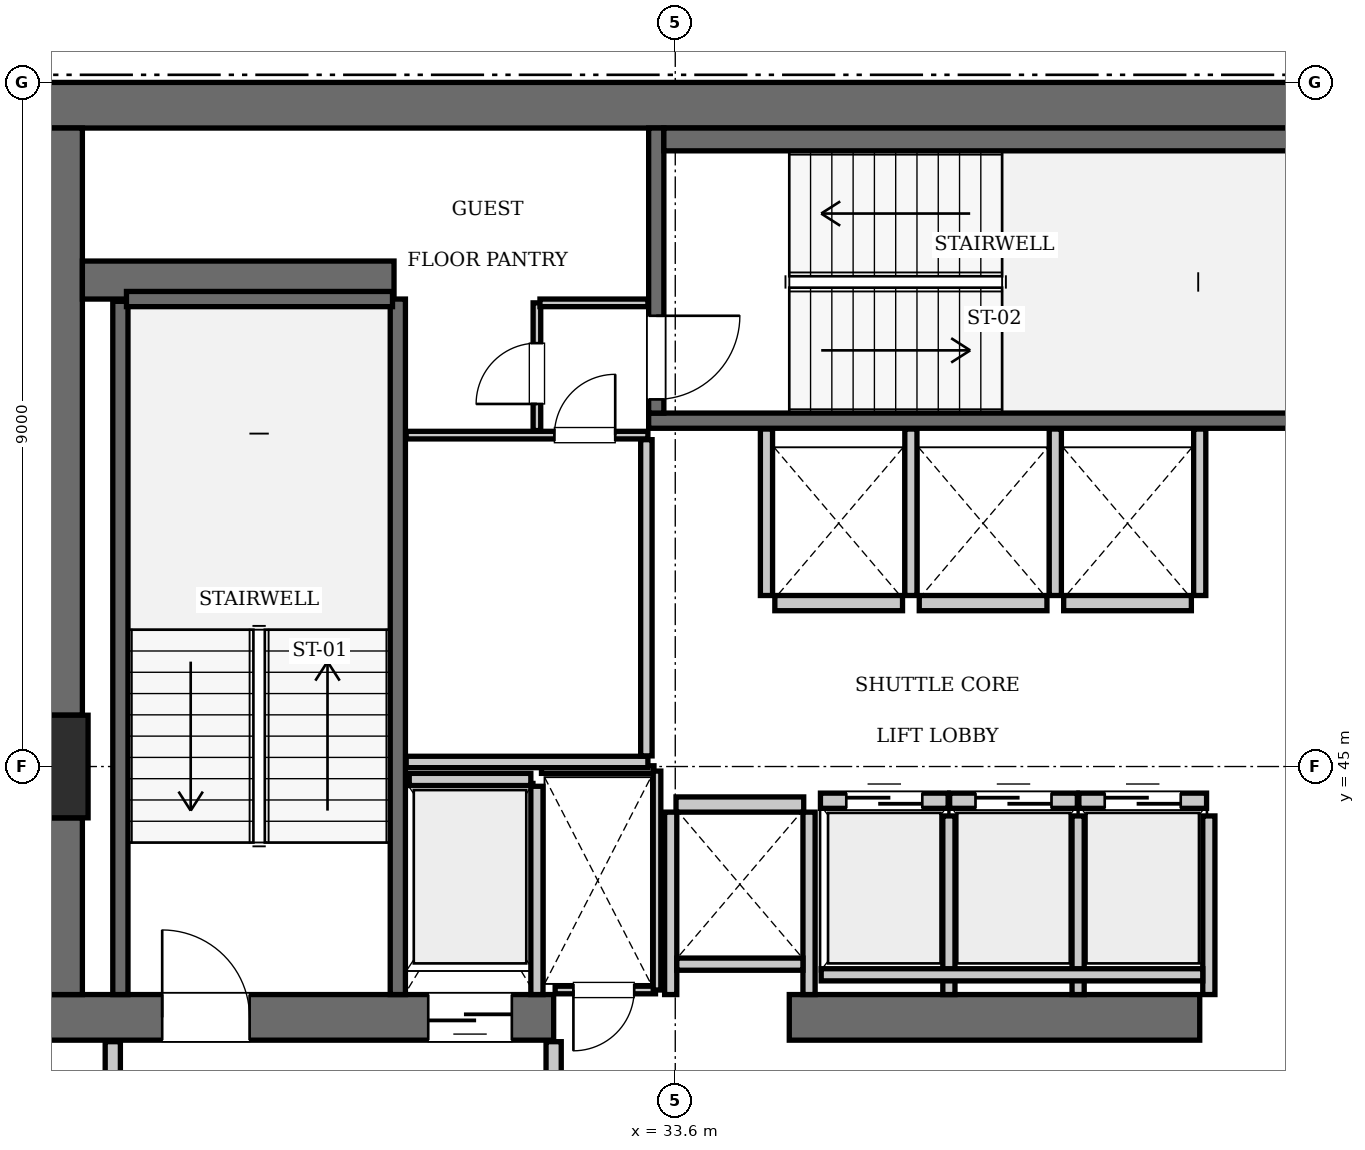
"""IFC4 building model, lengths in metres.
Left out: names, types, materials, properties, quantities, classifications, styles, units other than length and angle.
Written with IfcOpenShell. Run it as: python <this file> out.ifc"""

import sys

from ifc_helpers import new_model, si_unit, direction, frame, frame_2d, origin, origin_2d, place, context, subcontext, project, spatial, rectangle, extrude, element, fill, save


model = new_model("IFC4")
c1 = context("Model", 3, precision=1e-05, world=origin(), true_north=direction((0.0, 1.0)))
c2 = subcontext(c1, "Body", "Model", "MODEL_VIEW")
j1 = project(units=[si_unit("LENGTHUNIT", "METRE"), si_unit("PLANEANGLEUNIT", "RADIAN")], contexts=[c1])
p1 = place(None, origin())
s1 = spatial("IfcSite", under=j1, at=p1, CompositionType="ELEMENT")
p2 = place(p1, origin())
s2 = spatial("IfcBuilding", under=s1, at=p2, CompositionType="ELEMENT")
p3 = place(p2, frame((0.0, 0.0, 333.55)))
s3 = spatial("IfcBuildingStorey", under=s2, at=p3, CompositionType="ELEMENT", Elevation=333.55)
p4 = place(p3, frame((25.2, 45.0, 0.0), z_axis=(0.0, 0.0, 1.0), x_axis=(1.0, 0.0, 0.0)))
e1 = element("IfcColumn", 1, at=p4, inside=s3, PredefinedType="COLUMN", context=c2, shape_type="SweptSolid", body=[
    extrude(rectangle(XDim=1.35, YDim=1.35, at=origin_2d()), origin(), (0.0, 0.0, 1.0), 3.85),
])
p5 = place(p3, frame((25.2, 53.7, 0.0), z_axis=(0.0, 0.0, 1.0), x_axis=(1.0, 0.0, 0.0)))
e2 = element("IfcWall", 2, at=p5, inside=s3, PredefinedType="SHEAR", context=c2, shape_type="SweptSolid", body=[
    extrude(rectangle(XDim=25.2, YDim=0.6, at=frame_2d((12.6, 0.0))), origin(), (0.0, 0.0, 1.0), 3.85),
])
p6 = place(p3, frame((25.2, 41.7, 0.0), z_axis=(0.0, 0.0, 1.0), x_axis=(1.0, 0.0, 0.0)))
e3 = element("IfcWall", 3, at=p6, inside=s3, PredefinedType="SHEAR", context=c2, shape_type="SweptSolid", body=[
    extrude(rectangle(XDim=6.8, YDim=0.6, at=frame_2d((3.4, 0.0))), origin(), (0.0, 0.0, 1.0), 3.85),
])
p7 = place(p6, frame((1.65, 0.0, 0.0)))
e4 = element("IfcOpeningElement", 4, at=p7, cuts=e3, PredefinedType="OPENING", context=c2, shape_type="SweptSolid", body=[
    extrude(rectangle(XDim=1.15, YDim=2.15, at=frame_2d((0.575, 1.075))), frame((0.0, 0.31, 0.0), z_axis=(0.0, -1.0, 0.0), x_axis=(1.0, 0.0, 0.0)), (0.0, 0.0, 1.0), 0.62),
])
p8 = place(p6, frame((5.15, 0.0, 0.0)))
e5 = element("IfcOpeningElement", 5, at=p8, cuts=e3, PredefinedType="OPENING", context=c2, shape_type="SweptSolid", body=[
    extrude(rectangle(XDim=1.1, YDim=2.2, at=frame_2d((0.55, 1.1))), frame((0.0, 0.31, 0.0), z_axis=(0.0, -1.0, 0.0), x_axis=(1.0, 0.0, 0.0)), (0.0, 0.0, 1.0), 0.62),
])
p9 = place(p3, frame((35.1, 41.7, 0.0), z_axis=(0.0, 0.0, 1.0), x_axis=(1.0, 0.0, 0.0)))
e6 = element("IfcWall", 6, at=p9, inside=s3, PredefinedType="SHEAR", context=c2, shape_type="SweptSolid", body=[
    extrude(rectangle(XDim=5.4, YDim=0.6, at=frame_2d((2.7, 0.0))), origin(), (0.0, 0.0, 1.0), 3.85),
])
p10 = place(p3, frame((25.5, 42.0, 0.0), z_axis=(0.0, 0.0, 1.0), x_axis=(0.0, 1.0, 0.0)))
e7 = element("IfcWall", 7, at=p10, inside=s3, PredefinedType="SHEAR", context=c2, shape_type="SweptSolid", body=[
    extrude(rectangle(XDim=2.325, YDim=0.6, at=frame_2d((1.163, 0.0))), origin(), (0.0, 0.0, 1.0), 3.85),
])
p11 = place(p3, frame((25.5, 45.675, 0.0), z_axis=(0.0, 0.0, 1.0), x_axis=(0.0, 1.0, 0.0)))
e8 = element("IfcWall", 8, at=p11, inside=s3, PredefinedType="SHEAR", context=c2, shape_type="SweptSolid", body=[
    extrude(rectangle(XDim=7.725, YDim=0.6, at=frame_2d((3.862, 0.0))), origin(), (0.0, 0.0, 1.0), 3.85),
])
p12 = place(p3, frame((25.8, 51.4, 0.0), z_axis=(0.0, 0.0, 1.0), x_axis=(1.0, 0.0, 0.0)))
e9 = element("IfcWall", 9, at=p12, inside=s3, PredefinedType="SHEAR", context=c2, shape_type="SweptSolid", body=[
    extrude(rectangle(XDim=4.1, YDim=0.5, at=frame_2d((2.05, 0.0))), origin(), (0.0, 0.0, 1.0), 3.85),
])
p13 = place(p3, frame((29.95, 42.0, 0.0), z_axis=(0.0, 0.0, 1.0), x_axis=(0.0, 1.0, 0.0)))
e10 = element("IfcWall", 10, at=p13, inside=s3, PredefinedType="SOLIDWALL", context=c2, shape_type="SweptSolid", body=[
    extrude(rectangle(XDim=9.15, YDim=0.2, at=frame_2d((4.575, 0.0))), origin(), (0.0, 0.0, 1.0), 3.61),
])
p14 = place(p3, frame((26.3, 42.0, 0.0), z_axis=(0.0, 0.0, 1.0), x_axis=(0.0, 1.0, 0.0)))
e11 = element("IfcWall", 11, at=p14, inside=s3, PredefinedType="SOLIDWALL", context=c2, shape_type="SweptSolid", body=[
    extrude(rectangle(XDim=9.12, YDim=0.2, at=frame_2d((4.56, 0.0))), origin(), (0.0, 0.0, 1.0), 3.61),
])
p15 = place(p3, frame((26.38, 51.15, 0.0), z_axis=(0.0, 0.0, 1.0), x_axis=(1.0, 0.0, 0.0)))
e12 = element("IfcWall", 12, at=p15, inside=s3, PredefinedType="SOLIDWALL", context=c2, shape_type="SweptSolid", body=[
    extrude(rectangle(XDim=3.5, YDim=0.2, at=frame_2d((1.75, 0.0))), origin(), (0.0, 0.0, 1.0), 3.61),
])
p16 = place(p3, frame((33.25, 49.55, 0.0), z_axis=(0.0, 0.0, 1.0), x_axis=(1.0, 0.0, 0.0)))
e13 = element("IfcWall", 13, at=p16, inside=s3, PredefinedType="SOLIDWALL", context=c2, shape_type="SweptSolid", body=[
    extrude(rectangle(XDim=9.1, YDim=0.2, at=frame_2d((4.55, 0.0))), origin(), (0.0, 0.0, 1.0), 3.61),
])
p17 = place(p3, frame((33.35, 49.65, 0.0), z_axis=(0.0, 0.0, 1.0), x_axis=(0.0, 1.0, 0.0)))
e14 = element("IfcWall", 14, at=p17, inside=s3, PredefinedType="SOLIDWALL", context=c2, shape_type="SweptSolid", body=[
    extrude(rectangle(XDim=3.75, YDim=0.2, at=frame_2d((1.875, 0.0))), origin(), (0.0, 0.0, 1.0), 3.61),
])
p18 = place(p17, frame((0.18, 0.0, 0.0)))
e15 = element("IfcOpeningElement", 15, at=p18, cuts=e14, PredefinedType="OPENING", context=c2, shape_type="SweptSolid", body=[
    extrude(rectangle(XDim=1.1, YDim=2.15, at=frame_2d((0.55, 1.075))), frame((0.0, 0.11, 0.0), z_axis=(0.0, -1.0, 0.0), x_axis=(1.0, 0.0, 0.0)), (0.0, 0.0, 1.0), 0.22),
])
p19 = place(p3, frame((33.45, 53.25, 0.0), z_axis=(0.0, 0.0, 1.0), x_axis=(1.0, 0.0, 0.0)))
e16 = element("IfcWall", 16, at=p19, inside=s3, PredefinedType="SOLIDWALL", context=c2, shape_type="SweptSolid", body=[
    extrude(rectangle(XDim=8.7, YDim=0.3, at=frame_2d((4.35, 0.0))), origin(), (0.0, 0.0, 1.0), 3.61),
])
p20 = place(p3, frame((35.51, 44.55, 0.0), z_axis=(0.0, 0.0, 1.0), x_axis=(1.0, 0.0, 0.0)))
e17 = element("IfcWall", 17, at=p20, inside=s3, PredefinedType="SOLIDWALL", context=c2, shape_type="SweptSolid", body=[
    extrude(rectangle(XDim=1.68, YDim=0.2, at=frame_2d((0.84, 0.0))), origin(), (0.0, 0.0, 1.0), 3.61),
])
p21 = place(p20, frame((0.34, 0.0, 0.0)))
e18 = element("IfcOpeningElement", 18, at=p21, cuts=e17, PredefinedType="OPENING", context=c2, shape_type="SweptSolid", body=[
    extrude(rectangle(XDim=1.0, YDim=2.15, at=frame_2d((0.5, 1.075))), frame((0.0, 0.11, 0.0), z_axis=(0.0, -1.0, 0.0), x_axis=(1.0, 0.0, 0.0)), (0.0, 0.0, 1.0), 0.22),
])
p22 = place(p3, frame((37.21, 44.55, 0.0), z_axis=(0.0, 0.0, 1.0), x_axis=(1.0, 0.0, 0.0)))
e19 = element("IfcWall", 19, at=p22, inside=s3, PredefinedType="SOLIDWALL", context=c2, shape_type="SweptSolid", body=[
    extrude(rectangle(XDim=1.68, YDim=0.2, at=frame_2d((0.84, 0.0))), origin(), (0.0, 0.0, 1.0), 3.61),
])
p23 = place(p22, frame((0.34, 0.0, 0.0)))
e20 = element("IfcOpeningElement", 20, at=p23, cuts=e19, PredefinedType="OPENING", context=c2, shape_type="SweptSolid", body=[
    extrude(rectangle(XDim=1.0, YDim=2.15, at=frame_2d((0.5, 1.075))), frame((0.0, 0.11, 0.0), z_axis=(0.0, -1.0, 0.0), x_axis=(1.0, 0.0, 0.0)), (0.0, 0.0, 1.0), 0.22),
])
p24 = place(p3, frame((38.91, 44.55, 0.0), z_axis=(0.0, 0.0, 1.0), x_axis=(1.0, 0.0, 0.0)))
e21 = element("IfcWall", 21, at=p24, inside=s3, PredefinedType="SOLIDWALL", context=c2, shape_type="SweptSolid", body=[
    extrude(rectangle(XDim=1.68, YDim=0.2, at=frame_2d((0.84, 0.0))), origin(), (0.0, 0.0, 1.0), 3.61),
])
p25 = place(p24, frame((0.34, 0.0, 0.0)))
e22 = element("IfcOpeningElement", 22, at=p25, cuts=e21, PredefinedType="OPENING", context=c2, shape_type="SweptSolid", body=[
    extrude(rectangle(XDim=1.0, YDim=2.15, at=frame_2d((0.5, 1.075))), frame((0.0, 0.11, 0.0), z_axis=(0.0, -1.0, 0.0), x_axis=(1.0, 0.0, 0.0)), (0.0, 0.0, 1.0), 0.22),
])
p26 = place(p3, frame((34.91, 47.15, 0.0), z_axis=(0.0, 0.0, 1.0), x_axis=(1.0, 0.0, 0.0)))
e23 = element("IfcWall", 23, at=p26, inside=s3, PredefinedType="SOLIDWALL", context=c2, shape_type="SweptSolid", body=[
    extrude(rectangle(XDim=1.68, YDim=0.2, at=frame_2d((0.84, 0.0))), origin(), (0.0, 0.0, 1.0), 3.61),
])
for number, where, z_axis, x_axis in (
    (24, (36.81, 47.15, 0.0), (0.0, 0.0, 1.0), (1.0, 0.0, 0.0)),
    (25, (38.71, 47.15, 0.0), (0.0, 0.0, 1.0), (1.0, 0.0, 0.0)),
    (26, (33.61, 44.5, 0.0), (0.0, 0.0, 1.0), (1.0, 0.0, 0.0)),
):
    element("IfcWall", number, at=place(p3, frame(where, z_axis=z_axis, x_axis=x_axis)), inside=s3, PredefinedType="SOLIDWALL", context=c2, shape_type="SweptSolid", body=[
        extrude(rectangle(XDim=1.68, YDim=0.2, at=frame_2d((0.84, 0.0))), origin(), (0.0, 0.0, 1.0), 3.61),
    ])
p27 = place(p3, frame((30.1, 44.83, 0.0), z_axis=(0.0, 0.0, 1.0), x_axis=(1.0, 0.0, 0.0)))
e27 = element("IfcWall", 27, at=p27, inside=s3, PredefinedType="SOLIDWALL", context=c2, shape_type="SweptSolid", body=[
    extrude(rectangle(XDim=1.6, YDim=0.16, at=frame_2d((0.8, 0.0))), origin(), (0.0, 0.0, 1.0), 3.61),
])
p28 = place(p3, frame((31.78, 42.0, 0.0), z_axis=(0.0, 0.0, 1.0), x_axis=(0.0, 1.0, 0.0)))
e28 = element("IfcWall", 28, at=p28, inside=s3, PredefinedType="SOLIDWALL", context=c2, shape_type="SweptSolid", body=[
    extrude(rectangle(XDim=2.74, YDim=0.16, at=frame_2d((1.37, 0.0))), origin(), (0.0, 0.0, 1.0), 3.61),
])
for number, where, z_axis, x_axis in (
    (29, (37.2, 42.0, 0.0), (0.0, 0.0, 1.0), (0.0, 1.0, 0.0)),
    (30, (38.9, 42.0, 0.0), (0.0, 0.0, 1.0), (0.0, 1.0, 0.0)),
    (31, (40.62, 42.0, 0.0), (0.0, 0.0, 1.0), (0.0, 1.0, 0.0)),
):
    element("IfcWall", number, at=place(p3, frame(where, z_axis=z_axis, x_axis=x_axis)), inside=s3, PredefinedType="SOLIDWALL", context=c2, shape_type="SweptSolid", body=[
        extrude(rectangle(XDim=2.35, YDim=0.16, at=frame_2d((1.175, 0.0))), origin(), (0.0, 0.0, 1.0), 3.61),
    ])
p29 = place(p3, frame((35.52, 42.26, 0.0), z_axis=(0.0, 0.0, 1.0), x_axis=(1.0, 0.0, 0.0)))
e32 = element("IfcWall", 32, at=p29, inside=s3, PredefinedType="SOLIDWALL", context=c2, shape_type="SweptSolid", body=[
    extrude(rectangle(XDim=5.02, YDim=0.16, at=frame_2d((2.51, 0.0))), origin(), (0.0, 0.0, 1.0), 3.61),
])
for number, where, z_axis, x_axis in (
    (33, (34.8, 47.25, 0.0), (0.0, 0.0, 1.0), (0.0, 1.0, 0.0)),
    (34, (36.7, 47.25, 0.0), (0.0, 0.0, 1.0), (0.0, 1.0, 0.0)),
    (35, (38.6, 47.25, 0.0), (0.0, 0.0, 1.0), (0.0, 1.0, 0.0)),
    (36, (40.5, 47.25, 0.0), (0.0, 0.0, 1.0), (0.0, 1.0, 0.0)),
):
    element("IfcWall", number, at=place(p3, frame(where, z_axis=z_axis, x_axis=x_axis)), inside=s3, PredefinedType="SOLIDWALL", context=c2, shape_type="SweptSolid", body=[
        extrude(rectangle(XDim=2.19, YDim=0.16, at=frame_2d((1.095, 0.0))), origin(), (0.0, 0.0, 1.0), 3.61),
    ])
for number, where, z_axis, x_axis in (
    (37, (33.54, 42.0, 0.0), (0.0, 0.0, 1.0), (0.0, 1.0, 0.0)),
    (38, (35.36, 42.0, 0.0), (0.0, 0.0, 1.0), (0.0, 1.0, 0.0)),
):
    element("IfcWall", number, at=place(p3, frame(where, z_axis=z_axis, x_axis=x_axis)), inside=s3, PredefinedType="SOLIDWALL", context=c2, shape_type="SweptSolid", body=[
        extrude(rectangle(XDim=2.4, YDim=0.16, at=frame_2d((1.2, 0.0))), origin(), (0.0, 0.0, 1.0), 3.61),
    ])
p30 = place(p3, frame((33.62, 42.4, 0.0), z_axis=(0.0, 0.0, 1.0), x_axis=(1.0, 0.0, 0.0)))
e39 = element("IfcWall", 39, at=p30, inside=s3, PredefinedType="SOLIDWALL", context=c2, shape_type="SweptSolid", body=[
    extrude(rectangle(XDim=1.66, YDim=0.16, at=frame_2d((0.83, 0.0))), origin(), (0.0, 0.0, 1.0), 3.61),
])
for number, where, z_axis, x_axis in (
    (40, (26.2, 38.31, 0.0), (0.0, 0.0, 1.0), (0.0, 1.0, 0.0)),
    (41, (32.0, 38.31, 0.0), (0.0, 0.0, 1.0), (0.0, 1.0, 0.0)),
):
    element("IfcWall", number, at=place(p3, frame(where, z_axis=z_axis, x_axis=x_axis)), inside=s3, PredefinedType="PARTITIONING", context=c2, shape_type="SweptSolid", body=[
        extrude(rectangle(XDim=3.07, YDim=0.2, at=frame_2d((1.535, 0.0))), origin(), (0.0, 0.0, 1.0), 3.61),
    ])
p31 = place(p3, frame((32.02, 42.06, 0.0), z_axis=(0.0, 0.0, 1.0), x_axis=(1.0, 0.0, 0.0)))
e42 = element("IfcWall", 42, at=p31, inside=s3, PredefinedType="PARTITIONING", context=c2, shape_type="SweptSolid", body=[
    extrude(rectangle(XDim=1.32, YDim=0.1, at=frame_2d((0.66, 0.0))), origin(), (0.0, 0.0, 1.0), 3.61),
])
p32 = place(p31, frame((0.24, 0.0, 0.0)))
e43 = element("IfcOpeningElement", 43, at=p32, cuts=e42, PredefinedType="OPENING", context=c2, shape_type="SweptSolid", body=[
    extrude(rectangle(XDim=0.8, YDim=2.05, at=frame_2d((0.4, 1.025))), frame((0.0, 0.06, 0.0), z_axis=(0.0, -1.0, 0.0), x_axis=(1.0, 0.0, 0.0)), (0.0, 0.0, 1.0), 0.12),
])
p33 = place(p3, frame((31.84, 44.96, 0.0), z_axis=(0.0, 0.0, 1.0), x_axis=(1.0, 0.0, 0.0)))
e44 = element("IfcWall", 44, at=p33, inside=s3, PredefinedType="PARTITIONING", context=c2, shape_type="SweptSolid", body=[
    extrude(rectangle(XDim=1.48, YDim=0.1, at=frame_2d((0.74, 0.0))), origin(), (0.0, 0.0, 1.0), 3.61),
])
p34 = place(p3, frame((33.36, 42.06, 0.0), z_axis=(0.0, 0.0, 1.0), x_axis=(0.0, 1.0, 0.0)))
e45 = element("IfcWall", 45, at=p34, inside=s3, PredefinedType="PARTITIONING", context=c2, shape_type="SweptSolid", body=[
    extrude(rectangle(XDim=2.88, YDim=0.1, at=frame_2d((1.44, 0.0))), origin(), (0.0, 0.0, 1.0), 3.61),
])
p35 = place(p3, frame((30.06, 45.06, 0.0), z_axis=(0.0, 0.0, 1.0), x_axis=(1.0, 0.0, 0.0)))
e46 = element("IfcWall", 46, at=p35, inside=s3, PredefinedType="PARTITIONING", context=c2, shape_type="SweptSolid", body=[
    extrude(rectangle(XDim=3.18, YDim=0.15, at=frame_2d((1.59, 0.0))), origin(), (0.0, 0.0, 1.0), 3.61),
])
p36 = place(p3, frame((33.22, 45.14, 0.0), z_axis=(0.0, 0.0, 1.0), x_axis=(0.0, 1.0, 0.0)))
e47 = element("IfcWall", 47, at=p36, inside=s3, PredefinedType="PARTITIONING", context=c2, shape_type="SweptSolid", body=[
    extrude(rectangle(XDim=4.16, YDim=0.15, at=frame_2d((2.08, 0.0))), origin(), (0.0, 0.0, 1.0), 3.61),
])
p37 = place(p3, frame((30.06, 49.36, 0.0), z_axis=(0.0, 0.0, 1.0), x_axis=(1.0, 0.0, 0.0)))
e48 = element("IfcWall", 48, at=p37, inside=s3, PredefinedType="PARTITIONING", context=c2, shape_type="SweptSolid", body=[
    extrude(rectangle(XDim=3.18, YDim=0.1, at=frame_2d((1.59, 0.0))), origin(), (0.0, 0.0, 1.0), 3.61),
])
p38 = place(p37, frame((1.95, 0.0, 0.0)))
e49 = element("IfcOpeningElement", 49, at=p38, cuts=e48, PredefinedType="OPENING", context=c2, shape_type="SweptSolid", body=[
    extrude(rectangle(XDim=0.8, YDim=2.05, at=frame_2d((0.4, 1.025))), frame((0.0, 0.06, 0.0), z_axis=(0.0, -1.0, 0.0), x_axis=(1.0, 0.0, 0.0)), (0.0, 0.0, 1.0), 0.12),
])
p39 = place(p3, frame((31.78, 49.42, 0.0), z_axis=(0.0, 0.0, 1.0), x_axis=(0.0, 1.0, 0.0)))
e50 = element("IfcWall", 50, at=p39, inside=s3, PredefinedType="PARTITIONING", context=c2, shape_type="SweptSolid", body=[
    extrude(rectangle(XDim=1.68, YDim=0.1, at=frame_2d((0.84, 0.0))), origin(), (0.0, 0.0, 1.0), 3.61),
])
p40 = place(p39, frame((0.35, 0.0, 0.0)))
e51 = element("IfcOpeningElement", 51, at=p40, cuts=e50, PredefinedType="OPENING", context=c2, shape_type="SweptSolid", body=[
    extrude(rectangle(XDim=0.8, YDim=2.05, at=frame_2d((0.4, 1.025))), frame((0.0, 0.06, 0.0), z_axis=(0.0, -1.0, 0.0), x_axis=(1.0, 0.0, 0.0)), (0.0, 0.0, 1.0), 0.12),
])
p41 = place(p3, frame((31.82, 51.1, 0.0), z_axis=(0.0, 0.0, 1.0), x_axis=(1.0, 0.0, 0.0)))
e52 = element("IfcWall", 52, at=p41, inside=s3, PredefinedType="PARTITIONING", context=c2, shape_type="SweptSolid", body=[
    extrude(rectangle(XDim=1.42, YDim=0.1, at=frame_2d((0.71, 0.0))), origin(), (0.0, 0.0, 1.0), 3.61),
])
p42 = place(p7, origin())
e53 = element("IfcDoor", 53, at=p42, inside=s3, OperationType="SINGLE_SWING_LEFT", PredefinedType="DOOR", context=c2, shape_type="SweptSolid", body=[
    extrude(rectangle(XDim=1.15, YDim=2.15, at=frame_2d((0.575, 1.075))), frame((0.0, 0.025, 0.0), z_axis=(0.0, -1.0, 0.0), x_axis=(1.0, 0.0, 0.0)), (0.0, 0.0, 1.0), 0.05),
])
fill(e4, e53)
p43 = place(p18, frame((1.1, 0.0, 0.0), z_axis=(0.0, 0.0, 1.0), x_axis=(-1.0, 0.0, 0.0)))
e54 = element("IfcDoor", 54, at=p43, inside=s3, OperationType="SINGLE_SWING_LEFT", PredefinedType="DOOR", context=c2, shape_type="SweptSolid", body=[
    extrude(rectangle(XDim=1.1, YDim=2.15, at=frame_2d((0.55, 1.075))), frame((0.0, 0.025, 0.0), z_axis=(0.0, -1.0, 0.0), x_axis=(1.0, 0.0, 0.0)), (0.0, 0.0, 1.0), 0.05),
])
fill(e15, e54)
p44 = place(p21, origin())
e55 = element("IfcDoor", 55, at=p44, inside=s3, OperationType="SLIDING_TO_LEFT", PredefinedType="DOOR", context=c2, shape_type="SweptSolid", body=[
    extrude(rectangle(XDim=1.0, YDim=2.15, at=frame_2d((0.5, 1.075))), frame((0.0, 0.025, 0.0), z_axis=(0.0, -1.0, 0.0), x_axis=(1.0, 0.0, 0.0)), (0.0, 0.0, 1.0), 0.05),
])
fill(e18, e55)
p45 = place(p23, origin())
e56 = element("IfcDoor", 56, at=p45, inside=s3, OperationType="SLIDING_TO_LEFT", PredefinedType="DOOR", context=c2, shape_type="SweptSolid", body=[
    extrude(rectangle(XDim=1.0, YDim=2.15, at=frame_2d((0.5, 1.075))), frame((0.0, 0.025, 0.0), z_axis=(0.0, -1.0, 0.0), x_axis=(1.0, 0.0, 0.0)), (0.0, 0.0, 1.0), 0.05),
])
fill(e20, e56)
p46 = place(p25, origin())
e57 = element("IfcDoor", 57, at=p46, inside=s3, OperationType="SLIDING_TO_LEFT", PredefinedType="DOOR", context=c2, shape_type="SweptSolid", body=[
    extrude(rectangle(XDim=1.0, YDim=2.15, at=frame_2d((0.5, 1.075))), frame((0.0, 0.025, 0.0), z_axis=(0.0, -1.0, 0.0), x_axis=(1.0, 0.0, 0.0)), (0.0, 0.0, 1.0), 0.05),
])
fill(e22, e57)
p47 = place(p8, frame((1.1, 0.0, 0.0), z_axis=(0.0, 0.0, 1.0), x_axis=(-1.0, 0.0, 0.0)))
e58 = element("IfcDoor", 58, at=p47, inside=s3, OperationType="SLIDING_TO_LEFT", PredefinedType="DOOR", context=c2, shape_type="SweptSolid", body=[
    extrude(rectangle(XDim=1.1, YDim=2.2, at=frame_2d((0.55, 1.1))), frame((0.0, 0.025, 0.0), z_axis=(0.0, -1.0, 0.0), x_axis=(1.0, 0.0, 0.0)), (0.0, 0.0, 1.0), 0.05),
])
fill(e5, e58)
p48 = place(p32, frame((0.8, 0.0, 0.0), z_axis=(0.0, 0.0, 1.0), x_axis=(-1.0, 0.0, 0.0)))
e59 = element("IfcDoor", 59, at=p48, inside=s3, OperationType="SINGLE_SWING_RIGHT", PredefinedType="DOOR", context=c2, shape_type="SweptSolid", body=[
    extrude(rectangle(XDim=0.8, YDim=2.05, at=frame_2d((0.4, 1.025))), frame((0.0, 0.025, 0.0), z_axis=(0.0, -1.0, 0.0), x_axis=(1.0, 0.0, 0.0)), (0.0, 0.0, 1.0), 0.05),
])
fill(e43, e59)
p49 = place(p38, origin())
e60 = element("IfcDoor", 60, at=p49, inside=s3, OperationType="SINGLE_SWING_RIGHT", PredefinedType="DOOR", context=c2, shape_type="SweptSolid", body=[
    extrude(rectangle(XDim=0.8, YDim=2.05, at=frame_2d((0.4, 1.025))), frame((0.0, 0.025, 0.0), z_axis=(0.0, -1.0, 0.0), x_axis=(1.0, 0.0, 0.0)), (0.0, 0.0, 1.0), 0.05),
])
fill(e49, e60)
p50 = place(p40, origin())
e61 = element("IfcDoor", 61, at=p50, inside=s3, OperationType="SINGLE_SWING_LEFT", PredefinedType="DOOR", context=c2, shape_type="SweptSolid", body=[
    extrude(rectangle(XDim=0.8, YDim=2.05, at=frame_2d((0.4, 1.025))), frame((0.0, 0.025, 0.0), z_axis=(0.0, -1.0, 0.0), x_axis=(1.0, 0.0, 0.0)), (0.0, 0.0, 1.0), 0.05),
])
fill(e51, e61)
save(model, sys.argv[1])
